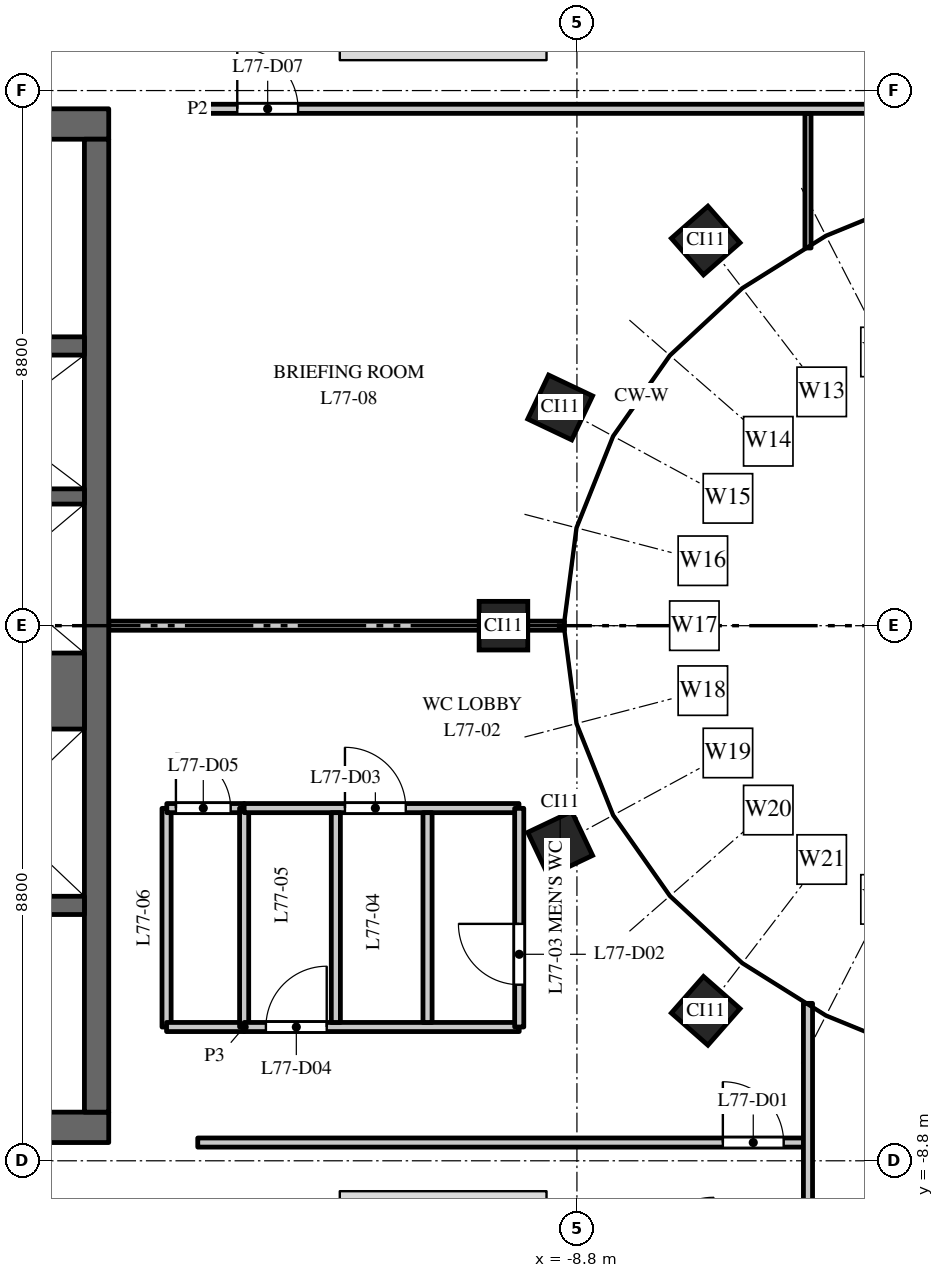
"""IFC4 building model, lengths in metres.
Left out: names, types, materials, properties, quantities, classifications, styles, units other than length and angle.
Written with IfcOpenShell. Run it as: python <this file> out.ifc"""

import sys

from ifc_helpers import new_model, si_unit, direction, frame, frame_2d, origin, origin_2d, place, context, subcontext, project, spatial, rectangle, extrude, element, fill, save


model = new_model("IFC4")
c1 = context("Model", 3, precision=1e-05, world=origin(), true_north=direction((0.0, 1.0)))
c2 = subcontext(c1, "Body", "Model", "MODEL_VIEW")
j1 = project(units=[si_unit("LENGTHUNIT", "METRE"), si_unit("PLANEANGLEUNIT", "RADIAN")], contexts=[c1])
p1 = place(None, origin())
s1 = spatial("IfcSite", under=j1, at=p1, CompositionType="ELEMENT")
p2 = place(p1, origin())
s2 = spatial("IfcBuilding", under=s1, at=p2, CompositionType="ELEMENT")
p3 = place(p2, frame((0.0, 0.0, 351.0)))
s3 = spatial("IfcBuildingStorey", under=s2, at=p3, CompositionType="ELEMENT", Elevation=351.0)
for number, where, z_axis, x_axis in (
    (1, (-19.92, 12.714, 0.024), (0.489, -0.459, 0.741), (0.685, 0.729, 0.0)),
    (2, (-19.92, -12.714, 0.024), (0.489, 0.459, 0.741), (-0.685, 0.729, 0.0)),
):
    element("IfcColumn", number, at=place(p3, frame(where, z_axis=z_axis, x_axis=x_axis)), inside=s3, PredefinedType="COLUMN", context=c2, shape_type="SweptSolid", body=[
        extrude(rectangle(XDim=0.85, YDim=0.85, at=origin_2d()), origin(), (0.0, 0.0, 1.0), 7.385),
    ])
for number, where, z_axis, x_axis in (
    (3, (-6.682, 6.334, 0.0), (0.0, 0.0, 1.0), (-0.751, -0.66, 0.0)),
    (4, (-9.076, 3.588, 0.0), (0.0, 0.0, 1.0), (-0.429, -0.903, 0.0)),
    (5, (-10.008, 0.0, 0.0), (0.0, 0.0, 1.0), (0.0, -1.0, 0.0)),
    (6, (-9.076, -3.588, 0.0), (0.0, 0.0, 1.0), (0.429, -0.903, 0.0)),
    (7, (-6.682, -6.334, 0.0), (0.0, 0.0, 1.0), (0.751, -0.66, 0.0)),
):
    element("IfcColumn", number, at=place(p3, frame(where, z_axis=z_axis, x_axis=x_axis)), inside=s3, PredefinedType="COLUMN", context=c2, shape_type="SweptSolid", body=[
        extrude(rectangle(XDim=0.8, YDim=0.8, at=origin_2d()), origin(), (0.0, 0.0, 1.0), 5.5),
    ])
p4 = place(p3, frame((-16.5, 8.25, 0.0), z_axis=(0.0, 0.0, 1.0), x_axis=(-1.0, 0.0, 0.0)))
e8 = element("IfcWall", 8, at=p4, inside=s3, PredefinedType="SHEAR", context=c2, shape_type="SweptSolid", body=[
    extrude(rectangle(XDim=6.981, YDim=0.5, at=frame_2d((3.491, 0.0))), origin(), (0.0, 0.0, 1.0), 5.3),
])
p5 = place(p4, frame((5.53, 0.0, 0.0)))
e9 = element("IfcOpeningElement", 9, at=p5, cuts=e8, PredefinedType="OPENING", context=c2, shape_type="SweptSolid", body=[
    extrude(rectangle(XDim=1.0, YDim=2.1, at=frame_2d((0.5, 1.05))), frame((0.0, 0.26, 0.0), z_axis=(0.0, -1.0, 0.0), x_axis=(1.0, 0.0, 0.0)), (0.0, 0.0, 1.0), 0.52),
])
p6 = place(p3, frame((-16.5, -8.25, 0.0), z_axis=(0.0, 0.0, 1.0), x_axis=(-1.0, 0.0, 0.0)))
e10 = element("IfcWall", 10, at=p6, inside=s3, PredefinedType="SHEAR", context=c2, shape_type="SweptSolid", body=[
    extrude(rectangle(XDim=6.981, YDim=0.5, at=frame_2d((3.491, 0.0))), origin(), (0.0, 0.0, 1.0), 5.3),
])
p7 = place(p6, frame((5.53, 0.0, 0.0)))
e11 = element("IfcOpeningElement", 11, at=p7, cuts=e10, PredefinedType="OPENING", context=c2, shape_type="SweptSolid", body=[
    extrude(rectangle(XDim=1.0, YDim=2.1, at=frame_2d((0.5, 1.05))), frame((0.0, 0.26, 0.0), z_axis=(0.0, -1.0, 0.0), x_axis=(1.0, 0.0, 0.0)), (0.0, 0.0, 1.0), 0.52),
])
p8 = place(p3, frame((-16.7, -8.0, 0.0), z_axis=(0.0, 0.0, 1.0), x_axis=(0.0, 1.0, 0.0)))
e12 = element("IfcWall", 12, at=p8, inside=s3, PredefinedType="SHEAR", context=c2, shape_type="SweptSolid", body=[
    extrude(rectangle(XDim=16.0, YDim=0.4, at=frame_2d((8.0, 0.0))), origin(), (0.0, 0.0, 1.0), 5.3),
])
p9 = place(p3, frame((-16.9, -1.075, 0.0), z_axis=(0.0, 0.0, 1.0), x_axis=(-1.0, 0.0, 0.0)))
e13 = element("IfcWall", 13, at=p9, inside=s3, PredefinedType="SHEAR", context=c2, shape_type="SweptSolid", body=[
    extrude(rectangle(XDim=2.9, YDim=1.25, at=frame_2d((1.45, 0.0))), origin(), (0.0, 0.0, 1.0), 5.3),
])
p10 = place(p3, frame((-16.9, 2.125, 0.0), z_axis=(0.0, 0.0, 1.0), x_axis=(-1.0, 0.0, 0.0)))
e14 = element("IfcWall", 14, at=p10, inside=s3, PredefinedType="SHEAR", context=c2, shape_type="SweptSolid", body=[
    extrude(rectangle(XDim=2.9, YDim=0.25, at=frame_2d((1.45, 0.0))), origin(), (0.0, 0.0, 1.0), 5.3),
])
p11 = place(p3, frame((-16.9, 4.6, 0.0), z_axis=(0.0, 0.0, 1.0), x_axis=(-1.0, 0.0, 0.0)))
e15 = element("IfcWall", 15, at=p11, inside=s3, PredefinedType="SHEAR", context=c2, shape_type="SweptSolid", body=[
    extrude(rectangle(XDim=6.18, YDim=0.3, at=frame_2d((3.09, 0.0))), origin(), (0.0, 0.0, 1.0), 5.3),
])
p12 = place(p11, frame((4.9, 0.0, 0.0)))
e16 = element("IfcOpeningElement", 16, at=p12, cuts=e15, PredefinedType="OPENING", context=c2, shape_type="SweptSolid", body=[
    extrude(rectangle(XDim=1.1, YDim=2.1, at=frame_2d((0.55, 1.05))), frame((0.0, 0.16, 0.0), z_axis=(0.0, -1.0, 0.0), x_axis=(1.0, 0.0, 0.0)), (0.0, 0.0, 1.0), 0.32),
])
p13 = place(p3, frame((-16.9, -4.6, 0.0), z_axis=(0.0, 0.0, 1.0), x_axis=(-1.0, 0.0, 0.0)))
e17 = element("IfcWall", 17, at=p13, inside=s3, PredefinedType="SHEAR", context=c2, shape_type="SweptSolid", body=[
    extrude(rectangle(XDim=6.18, YDim=0.3, at=frame_2d((3.09, 0.0))), origin(), (0.0, 0.0, 1.0), 5.3),
])
p14 = place(p13, frame((4.9, 0.0, 0.0)))
e18 = element("IfcOpeningElement", 18, at=p14, cuts=e17, PredefinedType="OPENING", context=c2, shape_type="SweptSolid", body=[
    extrude(rectangle(XDim=1.1, YDim=2.1, at=frame_2d((0.55, 1.05))), frame((0.0, 0.16, 0.0), z_axis=(0.0, -1.0, 0.0), x_axis=(1.0, 0.0, 0.0)), (0.0, 0.0, 1.0), 0.32),
])
p15 = place(p3, frame((-16.5, 0.0, 0.0), z_axis=(0.0, 0.0, 1.0), x_axis=(1.0, 0.0, 0.0)))
e19 = element("IfcWall", 19, at=p15, inside=s3, PredefinedType="PARTITIONING", context=c2, shape_type="SweptSolid", body=[
    extrude(rectangle(XDim=7.495, YDim=0.15, at=frame_2d((3.748, 0.0))), origin(), (0.0, 0.0, 1.0), 4.2),
])
p16 = place(p3, frame((-15.549, -6.6, 0.0), z_axis=(0.0, 0.0, 1.0), x_axis=(0.0, 1.0, 0.0)))
e20 = element("IfcWall", 20, at=p16, inside=s3, PredefinedType="PARTITIONING", context=c2, shape_type="SweptSolid", body=[
    extrude(rectangle(XDim=3.596, YDim=0.15, at=frame_2d((1.798, 0.0))), origin(), (0.0, 0.0, 1.0), 5.2),
])
p17 = place(p3, frame((-15.549, -6.6, 0.0), z_axis=(0.0, 0.0, 1.0), x_axis=(1.0, 0.0, 0.0)))
e21 = element("IfcWall", 21, at=p17, inside=s3, PredefinedType="PARTITIONING", context=c2, shape_type="SweptSolid", body=[
    extrude(rectangle(XDim=1.276, YDim=0.15, at=frame_2d((0.638, 0.0))), origin(), (0.0, 0.0, 1.0), 5.2),
])
p18 = place(p3, frame((-15.545, -3.0, 0.0), z_axis=(0.0, 0.0, 1.0), x_axis=(1.0, 0.0, 0.0)))
e22 = element("IfcWall", 22, at=p18, inside=s3, PredefinedType="PARTITIONING", context=c2, shape_type="SweptSolid", body=[
    extrude(rectangle(XDim=1.272, YDim=0.15, at=frame_2d((0.636, 0.0))), origin(), (0.0, 0.0, 1.0), 5.2),
])
p19 = place(p18, frame((0.15, 0.0, 0.0)))
e23 = element("IfcOpeningElement", 23, at=p19, cuts=e22, PredefinedType="OPENING", context=c2, shape_type="SweptSolid", body=[
    extrude(rectangle(XDim=0.9, YDim=2.1, at=frame_2d((0.45, 1.05))), frame((0.0, 0.085, 0.0), z_axis=(0.0, -1.0, 0.0), x_axis=(1.0, 0.0, 0.0)), (0.0, 0.0, 1.0), 0.17),
])
p20 = place(p3, frame((-15.036, -8.5, 0.0), z_axis=(0.0, 0.0, 1.0), x_axis=(1.0, 0.0, 0.0)))
e24 = element("IfcWall", 24, at=p20, inside=s3, PredefinedType="PARTITIONING", context=c2, shape_type="SweptSolid", body=[
    extrude(rectangle(XDim=9.961, YDim=0.15, at=frame_2d((4.98, 0.0))), origin(), (0.0, 0.0, 1.0), 4.6),
])
p21 = place(p20, frame((8.636, 0.0, 0.0)))
e25 = element("IfcOpeningElement", 25, at=p21, cuts=e24, PredefinedType="OPENING", context=c2, shape_type="SweptSolid", body=[
    extrude(rectangle(XDim=1.0, YDim=2.1, at=frame_2d((0.5, 1.05))), frame((0.0, 0.085, 0.0), z_axis=(0.0, -1.0, 0.0), x_axis=(1.0, 0.0, 0.0)), (0.0, 0.0, 1.0), 0.17),
])
p22 = place(p3, frame((-15.036, 8.5, 0.0), z_axis=(0.0, 0.0, 1.0), x_axis=(1.0, 0.0, 0.0)))
e26 = element("IfcWall", 26, at=p22, inside=s3, PredefinedType="PARTITIONING", context=c2, shape_type="SweptSolid", body=[
    extrude(rectangle(XDim=30.072, YDim=0.15, at=frame_2d((15.036, 0.0))), origin(), (0.0, 0.0, 1.0), 4.5),
])
p23 = place(p22, frame((0.65, 0.0, 0.0)))
e27 = element("IfcOpeningElement", 27, at=p23, cuts=e26, PredefinedType="OPENING", context=c2, shape_type="SweptSolid", body=[
    extrude(rectangle(XDim=1.0, YDim=2.1, at=frame_2d((0.5, 1.05))), frame((0.0, 0.085, 0.0), z_axis=(0.0, -1.0, 0.0), x_axis=(1.0, 0.0, 0.0)), (0.0, 0.0, 1.0), 0.17),
])
p24 = place(p22, frame((12.686, 0.0, 0.0)))
e28 = element("IfcOpeningElement", 28, at=p24, cuts=e26, PredefinedType="OPENING", context=c2, shape_type="SweptSolid", body=[
    extrude(rectangle(XDim=1.0, YDim=2.1, at=frame_2d((0.5, 1.05))), frame((0.0, 0.085, 0.0), z_axis=(0.0, -1.0, 0.0), x_axis=(1.0, 0.0, 0.0)), (0.0, 0.0, 1.0), 0.17),
])
p25 = place(p22, frame((28.436, 0.0, 0.0)))
e29 = element("IfcOpeningElement", 29, at=p25, cuts=e26, PredefinedType="OPENING", context=c2, shape_type="SweptSolid", body=[
    extrude(rectangle(XDim=1.0, YDim=2.1, at=frame_2d((0.5, 1.05))), frame((0.0, 0.085, 0.0), z_axis=(0.0, -1.0, 0.0), x_axis=(1.0, 0.0, 0.0)), (0.0, 0.0, 1.0), 0.17),
])
p26 = place(p3, frame((-14.273, -6.6, 0.0), z_axis=(0.0, 0.0, 1.0), x_axis=(0.0, 1.0, 0.0)))
e30 = element("IfcWall", 30, at=p26, inside=s3, PredefinedType="PARTITIONING", context=c2, shape_type="SweptSolid", body=[
    extrude(rectangle(XDim=3.6, YDim=0.15, at=frame_2d((1.8, 0.0))), origin(), (0.0, 0.0, 1.0), 5.2),
])
p27 = place(p3, frame((-14.273, -6.6, 0.0), z_axis=(0.0, 0.0, 1.0), x_axis=(1.0, 0.0, 0.0)))
e31 = element("IfcWall", 31, at=p27, inside=s3, PredefinedType="PARTITIONING", context=c2, shape_type="SweptSolid", body=[
    extrude(rectangle(XDim=4.524, YDim=0.15, at=frame_2d((2.262, 0.0))), origin(), (0.0, 0.0, 1.0), 4.6),
])
p28 = place(p27, frame((0.358, 0.0, 0.0)))
e32 = element("IfcOpeningElement", 32, at=p28, cuts=e31, PredefinedType="OPENING", context=c2, shape_type="SweptSolid", body=[
    extrude(rectangle(XDim=1.0, YDim=2.1, at=frame_2d((0.5, 1.05))), frame((0.0, 0.085, 0.0), z_axis=(0.0, -1.0, 0.0), x_axis=(1.0, 0.0, 0.0)), (0.0, 0.0, 1.0), 0.17),
])
p29 = place(p3, frame((-14.273, -3.0, 0.0), z_axis=(0.0, 0.0, 1.0), x_axis=(1.0, 0.0, 0.0)))
e33 = element("IfcWall", 33, at=p29, inside=s3, PredefinedType="PARTITIONING", context=c2, shape_type="SweptSolid", body=[
    extrude(rectangle(XDim=4.52, YDim=0.15, at=frame_2d((2.26, 0.0))), origin(), (0.0, 0.0, 1.0), 5.2),
])
p30 = place(p29, frame((1.658, 0.0, 0.0)))
e34 = element("IfcOpeningElement", 34, at=p30, cuts=e33, PredefinedType="OPENING", context=c2, shape_type="SweptSolid", body=[
    extrude(rectangle(XDim=1.0, YDim=2.1, at=frame_2d((0.5, 1.05))), frame((0.0, 0.085, 0.0), z_axis=(0.0, -1.0, 0.0), x_axis=(1.0, 0.0, 0.0)), (0.0, 0.0, 1.0), 0.17),
])
p31 = place(p3, frame((-12.765, -6.525, 0.0), z_axis=(0.0, 0.0, 1.0), x_axis=(0.0, 1.0, 0.0)))
e35 = element("IfcWall", 35, at=p31, inside=s3, PredefinedType="PARTITIONING", context=c2, shape_type="SweptSolid", body=[
    extrude(rectangle(XDim=3.45, YDim=0.15, at=frame_2d((1.725, 0.0))), origin(), (0.0, 0.0, 1.0), 5.2),
])
p32 = place(p3, frame((-11.257, -6.525, 0.0), z_axis=(0.0, 0.0, 1.0), x_axis=(0.0, 1.0, 0.0)))
e36 = element("IfcWall", 36, at=p32, inside=s3, PredefinedType="PARTITIONING", context=c2, shape_type="SweptSolid", body=[
    extrude(rectangle(XDim=3.45, YDim=0.15, at=frame_2d((1.725, 0.0))), origin(), (0.0, 0.0, 1.0), 4.6),
])
p33 = place(p3, frame((-9.749, -6.6, 0.0), z_axis=(0.0, 0.0, 1.0), x_axis=(0.0, 1.0, 0.0)))
e37 = element("IfcWall", 37, at=p33, inside=s3, PredefinedType="PARTITIONING", context=c2, shape_type="SweptSolid", body=[
    extrude(rectangle(XDim=3.596, YDim=0.15, at=frame_2d((1.798, 0.0))), origin(), (0.0, 0.0, 1.0), 4.6),
])
p34 = place(p33, frame((0.696, 0.0, 0.0)))
e38 = element("IfcOpeningElement", 38, at=p34, cuts=e37, PredefinedType="OPENING", context=c2, shape_type="SweptSolid", body=[
    extrude(rectangle(XDim=1.0, YDim=2.1, at=frame_2d((0.5, 1.05))), frame((0.0, 0.085, 0.0), z_axis=(0.0, -1.0, 0.0), x_axis=(1.0, 0.0, 0.0)), (0.0, 0.0, 1.0), 0.17),
])
p35 = place(p3, frame((-5.0, -10.4, 0.0), z_axis=(0.0, 0.0, 1.0), x_axis=(0.0, 1.0, 0.0)))
e39 = element("IfcWall", 39, at=p35, inside=s3, PredefinedType="PARTITIONING", context=c2, shape_type="SweptSolid", body=[
    extrude(rectangle(XDim=4.189, YDim=0.15, at=frame_2d((2.094, 0.0))), origin(), (0.0, 0.0, 1.0), 4.5),
])
p36 = place(p3, frame((-5.0, 6.211, 0.0), z_axis=(0.0, 0.0, 1.0), x_axis=(0.0, 1.0, 0.0)))
e40 = element("IfcWall", 40, at=p36, inside=s3, PredefinedType="PARTITIONING", context=c2, shape_type="SweptSolid", body=[
    extrude(rectangle(XDim=2.214, YDim=0.1, at=frame_2d((1.107, 0.0))), origin(), (0.0, 0.0, 1.0), 4.5),
])
p37 = place(p21, origin())
e41 = element("IfcDoor", 41, at=p37, inside=s3, OperationType="SINGLE_SWING_LEFT", PredefinedType="DOOR", context=c2, shape_type="SweptSolid", body=[
    extrude(rectangle(XDim=1.0, YDim=2.1, at=frame_2d((0.5, 1.05))), frame((0.0, 0.025, 0.0), z_axis=(0.0, -1.0, 0.0), x_axis=(1.0, 0.0, 0.0)), (0.0, 0.0, 1.0), 0.05),
])
fill(e25, e41)
p38 = place(p34, origin())
e42 = element("IfcDoor", 42, at=p38, inside=s3, OperationType="SINGLE_SWING_RIGHT", PredefinedType="DOOR", context=c2, shape_type="SweptSolid", body=[
    extrude(rectangle(XDim=1.0, YDim=2.1, at=frame_2d((0.5, 1.05))), frame((0.0, 0.025, 0.0), z_axis=(0.0, -1.0, 0.0), x_axis=(1.0, 0.0, 0.0)), (0.0, 0.0, 1.0), 0.05),
])
fill(e38, e42)
p39 = place(p30, origin())
e43 = element("IfcDoor", 43, at=p39, inside=s3, OperationType="SINGLE_SWING_LEFT", PredefinedType="DOOR", context=c2, shape_type="SweptSolid", body=[
    extrude(rectangle(XDim=1.0, YDim=2.1, at=frame_2d((0.5, 1.05))), frame((0.0, 0.025, 0.0), z_axis=(0.0, -1.0, 0.0), x_axis=(1.0, 0.0, 0.0)), (0.0, 0.0, 1.0), 0.05),
])
fill(e34, e43)
p40 = place(p28, origin())
e44 = element("IfcDoor", 44, at=p40, inside=s3, OperationType="SINGLE_SWING_RIGHT", PredefinedType="DOOR", context=c2, shape_type="SweptSolid", body=[
    extrude(rectangle(XDim=1.0, YDim=2.1, at=frame_2d((0.5, 1.05))), frame((0.0, 0.025, 0.0), z_axis=(0.0, -1.0, 0.0), x_axis=(1.0, 0.0, 0.0)), (0.0, 0.0, 1.0), 0.05),
])
fill(e32, e44)
p41 = place(p19, origin())
e45 = element("IfcDoor", 45, at=p41, inside=s3, OperationType="SINGLE_SWING_LEFT", PredefinedType="DOOR", context=c2, shape_type="SweptSolid", body=[
    extrude(rectangle(XDim=0.9, YDim=2.1, at=frame_2d((0.45, 1.05))), frame((0.0, 0.025, 0.0), z_axis=(0.0, -1.0, 0.0), x_axis=(1.0, 0.0, 0.0)), (0.0, 0.0, 1.0), 0.05),
])
fill(e23, e45)
p42 = place(p23, origin())
e46 = element("IfcDoor", 46, at=p42, inside=s3, OperationType="SINGLE_SWING_LEFT", PredefinedType="DOOR", context=c2, shape_type="SweptSolid", body=[
    extrude(rectangle(XDim=1.0, YDim=2.1, at=frame_2d((0.5, 1.05))), frame((0.0, 0.025, 0.0), z_axis=(0.0, -1.0, 0.0), x_axis=(1.0, 0.0, 0.0)), (0.0, 0.0, 1.0), 0.05),
])
fill(e27, e46)
save(model, sys.argv[1])
